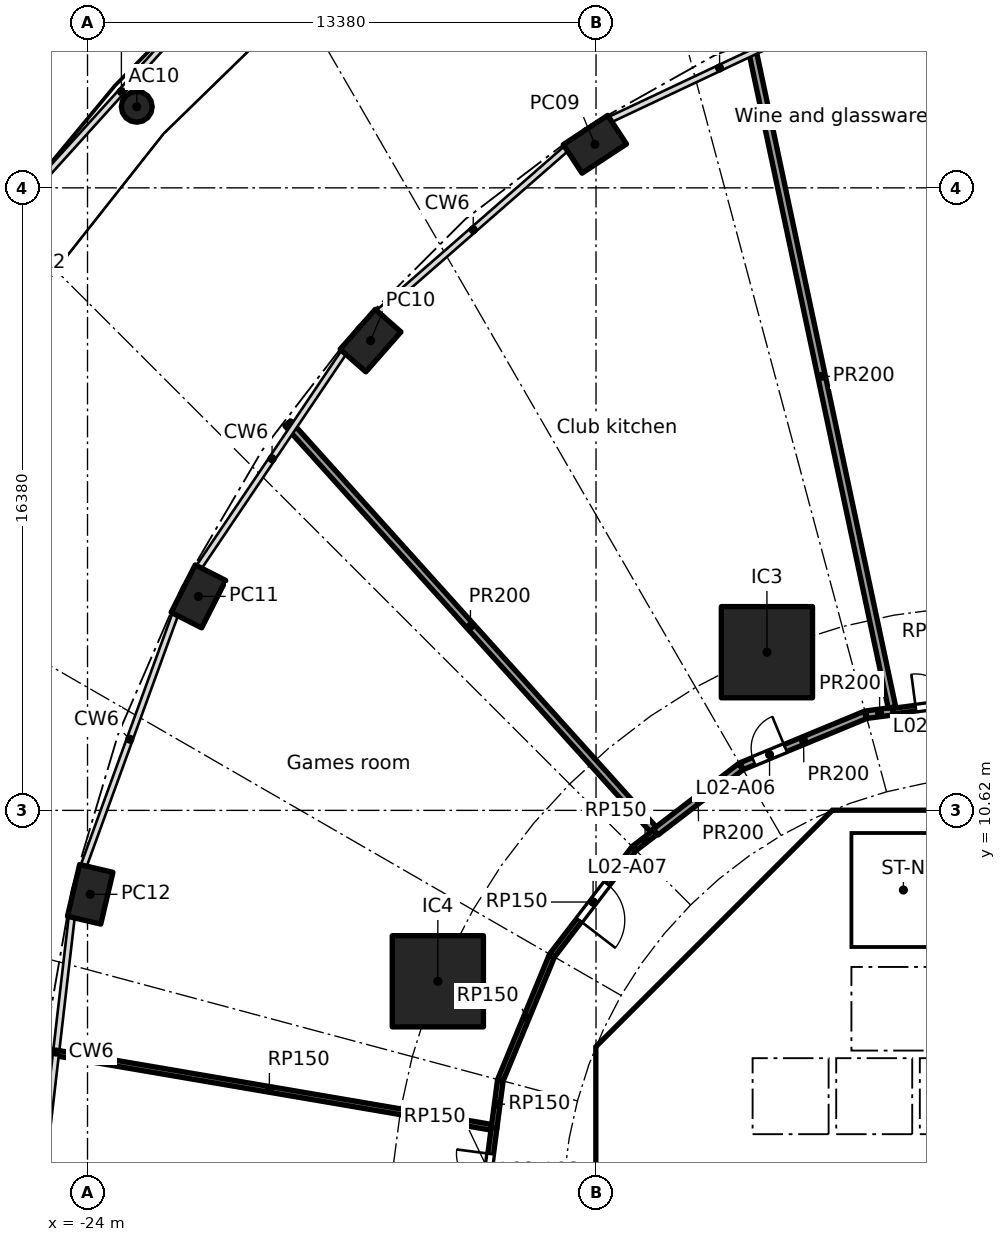
"""IFC4 building model, lengths in metres.
Left out: names, types, materials, properties, quantities, classifications, styles, units other than length and angle.
Written with IfcOpenShell. Run it as: python <this file> out.ifc"""

import sys

from ifc_helpers import new_model, si_unit, direction, frame, frame_2d, origin, origin_2d, place, context, subcontext, project, spatial, polyline, rectangle, hollow_rectangle, hollow_circle, outline, extrude, element, fill, save


model = new_model("IFC4")
c1 = context("Model", 3, precision=1e-05, world=origin(), true_north=direction((0.0, 1.0)))
c2 = subcontext(c1, "Body", "Model", "MODEL_VIEW")
j1 = project(units=[si_unit("LENGTHUNIT", "METRE"), si_unit("PLANEANGLEUNIT", "RADIAN")], contexts=[c1])
p1 = place(None, origin())
s1 = spatial("IfcSite", under=j1, at=p1, CompositionType="ELEMENT")
p2 = place(p1, origin())
s2 = spatial("IfcBuilding", under=s1, at=p2, CompositionType="ELEMENT")
p3 = place(p2, frame((0.0, 0.0, 12.0)))
s3 = spatial("IfcBuildingStorey", under=s2, at=p3, CompositionType="ELEMENT", Elevation=12.0)
for number, where, z_axis, x_axis in (
    (1, (-10.65, 28.146, 0.0), (0.0, 0.0, 1.0), (-0.836, -0.549, 0.0)),
    (2, (-16.552, 22.981, 0.0), (0.0, 0.0, 1.0), (-0.66, -0.751, 0.0)),
    (3, (-21.082, 16.25, 0.0), (0.0, 0.0, 1.0), (-0.452, -0.892, 0.0)),
    (4, (-23.929, 8.412, 0.0), (0.0, 0.0, 1.0), (-0.229, -0.973, 0.0)),
):
    element("IfcColumn", number, at=place(p3, frame(where, z_axis=z_axis, x_axis=x_axis)), inside=s3, PredefinedType="COLUMN", context=c2, shape_type="SweptSolid", body=[
        extrude(hollow_rectangle(XDim=1.4, YDim=0.9, WallThickness=0.05, at=origin_2d()), origin(), (0.0, 0.0, 1.0), 5.0),
    ])
for number, where, z_axis, x_axis in (
    (5, (-6.123, 14.782, 0.0), (0.0, 0.0, 1.0), (1.0, 0.0, 0.0)),
    (6, (-14.782, 6.123, 0.0), (0.0, 0.0, 1.0), (1.0, 0.0, 0.0)),
):
    element("IfcColumn", number, at=place(p3, frame(where, z_axis=z_axis, x_axis=x_axis)), inside=s3, PredefinedType="COLUMN", context=c2, shape_type="SweptSolid", body=[
        extrude(rectangle(XDim=2.4, YDim=2.4, at=origin_2d()), origin(), (0.0, 0.0, 1.0), 5.0),
    ])
p4 = place(p3, frame((-22.704, 29.133, 0.0), z_axis=(0.0, 0.0, 1.0), x_axis=(1.0, 0.0, 0.0)))
e7 = element("IfcColumn", 7, at=p4, inside=s3, PredefinedType="COLUMN", context=c2, shape_type="SweptSolid", body=[
    extrude(hollow_circle(Radius=0.406, WallThickness=0.025, at=origin_2d()), origin(), (0.0, 0.0, 1.0), 5.0),
])
p5 = place(p3, frame((-4.613, 9.988, 0.0), z_axis=(0.0, 0.0, 1.0), x_axis=(-0.707106781187, -0.707106781187, 0.0)))
e8 = element("IfcWall", 8, at=p5, inside=s3, PredefinedType="SHEAR", context=c2, shape_type="SweptSolid", body=[
    extrude(rectangle(XDim=7.602, YDim=0.6, at=frame_2d((3.801, 0.0))), origin(), (0.0, 0.0, 1.0), 4.7),
])
p6 = place(p5, frame((0.351, 0.0, 0.0)))
e9 = element("IfcOpeningElement", 9, at=p6, cuts=e8, PredefinedType="OPENING", context=c2, shape_type="SweptSolid", body=[
    extrude(rectangle(XDim=1.1, YDim=2.1, at=frame_2d((0.55, 1.05))), frame((0.0, 0.31, 0.0), z_axis=(0.0, -1.0, 0.0), x_axis=(1.0, 0.0, 0.0)), (0.0, 0.0, 1.0), 0.62),
])
p7 = place(p3, frame((-10.325, 3.801, 0.0), z_axis=(0.0, 0.0, 1.0), x_axis=(0.0, -1.0, 0.0)))
e10 = element("IfcWall", 10, at=p7, inside=s3, PredefinedType="SHEAR", context=c2, shape_type="SweptSolid", body=[
    extrude(rectangle(XDim=7.602, YDim=0.6, at=frame_2d((3.801, 0.0))), origin(), (0.0, 0.0, 1.0), 4.7),
])
p8 = place(p7, frame((0.651, 0.0, 0.0)))
e11 = element("IfcOpeningElement", 11, at=p8, cuts=e10, PredefinedType="OPENING", context=c2, shape_type="SweptSolid", body=[
    extrude(rectangle(XDim=1.5, YDim=2.1, at=frame_2d((0.75, 1.05))), frame((0.0, 0.31, 0.0), z_axis=(0.0, -1.0, 0.0), x_axis=(1.0, 0.0, 0.0)), (0.0, 0.0, 1.0), 0.62),
])
p9 = place(p7, frame((5.451, 0.0, 0.0)))
e12 = element("IfcOpeningElement", 12, at=p9, cuts=e10, PredefinedType="OPENING", context=c2, shape_type="SweptSolid", body=[
    extrude(rectangle(XDim=1.5, YDim=2.1, at=frame_2d((0.75, 1.05))), frame((0.0, 0.31, 0.0), z_axis=(0.0, -1.0, 0.0), x_axis=(1.0, 0.0, 0.0)), (0.0, 0.0, 1.0), 0.62),
])
p10 = place(p3, frame((-5.8, 4.3, 0.0), z_axis=(0.0, 0.0, 1.0), x_axis=(0.0, 1.0, 0.0)))
e13 = element("IfcWall", 13, at=p10, inside=s3, PredefinedType="PARTITIONING", context=c2, shape_type="SweptSolid", body=[
    extrude(rectangle(XDim=3.927, YDim=0.15, at=frame_2d((1.963, 0.0))), origin(), (0.0, 0.0, 1.0), 4.7),
])
p11 = place(p10, frame((1.551, 0.0, 0.0)))
e14 = element("IfcOpeningElement", 14, at=p11, cuts=e13, PredefinedType="OPENING", context=c2, shape_type="SweptSolid", body=[
    extrude(rectangle(XDim=0.9, YDim=2.1, at=frame_2d((0.45, 1.05))), frame((0.0, 0.085, 0.0), z_axis=(0.0, -1.0, 0.0), x_axis=(1.0, 0.0, 0.0)), (0.0, 0.0, 1.0), 0.17),
])
p12 = place(p3, frame((-4.0, 4.3, 0.0), z_axis=(0.0, 0.0, 1.0), x_axis=(0.0, 1.0, 0.0)))
e15 = element("IfcWall", 15, at=p12, inside=s3, PredefinedType="SOLIDWALL", context=c2, shape_type="SweptSolid", body=[
    extrude(rectangle(XDim=2.2, YDim=0.2, at=frame_2d((1.1, 0.0))), origin(), (0.0, 0.0, 1.0), 4.7),
])
p13 = place(p12, frame((0.55, 0.0, 0.0)))
e16 = element("IfcOpeningElement", 16, at=p13, cuts=e15, PredefinedType="OPENING", context=c2, shape_type="SweptSolid", body=[
    extrude(rectangle(XDim=1.1, YDim=2.1, at=frame_2d((0.55, 1.05))), frame((0.0, 0.11, 0.0), z_axis=(0.0, -1.0, 0.0), x_axis=(1.0, 0.0, 0.0)), (0.0, 0.0, 1.0), 0.22),
])
p14 = place(p3, frame((-6.7, 2.0, 0.0), z_axis=(0.0, 0.0, 1.0), x_axis=(1.0, 0.0, 0.0)))
e17 = element("IfcWall", 17, at=p14, inside=s3, PredefinedType="SOLIDWALL", context=c2, shape_type="SweptSolid", body=[
    extrude(rectangle(XDim=13.4, YDim=0.2, at=frame_2d((6.7, 0.0))), origin(), (0.0, 0.0, 1.0), 4.7),
])
p15 = place(p14, frame((0.65, 0.0, 0.0)))
e18 = element("IfcOpeningElement", 18, at=p15, cuts=e17, PredefinedType="OPENING", context=c2, shape_type="SweptSolid", body=[
    extrude(rectangle(XDim=1.1, YDim=2.1, at=frame_2d((0.55, 1.05))), frame((0.0, 0.11, 0.0), z_axis=(0.0, -1.0, 0.0), x_axis=(1.0, 0.0, 0.0)), (0.0, 0.0, 1.0), 0.22),
])
p16 = place(p14, frame((2.85, 0.0, 0.0)))
e19 = element("IfcOpeningElement", 19, at=p16, cuts=e17, PredefinedType="OPENING", context=c2, shape_type="SweptSolid", body=[
    extrude(rectangle(XDim=1.1, YDim=2.1, at=frame_2d((0.55, 1.05))), frame((0.0, 0.11, 0.0), z_axis=(0.0, -1.0, 0.0), x_axis=(1.0, 0.0, 0.0)), (0.0, 0.0, 1.0), 0.22),
])
p17 = place(p14, frame((5.05, 0.0, 0.0)))
e20 = element("IfcOpeningElement", 20, at=p17, cuts=e17, PredefinedType="OPENING", context=c2, shape_type="SweptSolid", body=[
    extrude(rectangle(XDim=1.1, YDim=2.1, at=frame_2d((0.55, 1.05))), frame((0.0, 0.11, 0.0), z_axis=(0.0, -1.0, 0.0), x_axis=(1.0, 0.0, 0.0)), (0.0, 0.0, 1.0), 0.22),
])
p18 = place(p3, origin())
e21 = element("IfcWall", 21, at=p18, inside=s3, PredefinedType="SHEAR", context=c2, shape_type="SweptSolid", body=[
    extrude(outline(polyline([(-10.2, 4.825), (-9.776, 4.401), (-10.025, 4.152), (-10.025, 3.801), (-10.625, 3.801), (-10.625, 4.401), (-10.2, 4.825)])), origin(), (0.0, 0.0, 1.0), 4.7),
])
p19 = place(p3, origin())
e22 = element("IfcWall", 22, at=p19, inside=s3, PredefinedType="SHEAR", context=c2, shape_type="SweptSolid", body=[
    extrude(outline(polyline([(-4.152, 10.025), (-4.401, 9.776), (-4.825, 10.2), (-4.401, 10.625), (4.401, 10.625), (4.825, 10.2), (4.401, 9.776), (4.152, 10.025), (-4.152, 10.025)])), origin(), (0.0, 0.0, 1.0), 4.7),
])
p20 = place(p3, origin())
e23 = element("IfcWall", 23, at=p20, inside=s3, PredefinedType="SOLIDWALL", context=c2, shape_type="SweptSolid", body=[
    extrude(outline(polyline([(-6.5, 2.1), (-6.7, 2.1), (-6.7, 4.3), (6.7, 4.3), (6.7, 2.1), (6.5, 2.1), (6.5, 4.1), (4.5, 4.1), (4.5, 2.1), (4.3, 2.1), (4.3, 4.1), (2.3, 4.1), (2.3, 2.1), (2.1, 2.1), (2.1, 4.1), (0.1, 4.1), (0.1, 2.1), (-0.1, 2.1), (-0.1, 4.1), (-2.1, 4.1), (-2.1, 2.1), (-2.3, 2.1), (-2.3, 4.1), (-4.3, 4.1), (-4.3, 2.1), (-4.5, 2.1), (-4.5, 4.1), (-6.5, 4.1), (-6.5, 2.1)])), origin(), (0.0, 0.0, 1.0), 4.7),
])
p21 = place(p3, frame((-10.025, 4.0, 0.0), z_axis=(0.0, 0.0, 1.0), x_axis=(1.0, 0.0, 0.0)))
e24 = element("IfcWall", 24, at=p21, inside=s3, PredefinedType="PARTITIONING", context=c2, shape_type="SweptSolid", body=[
    extrude(rectangle(XDim=3.325, YDim=0.2, at=frame_2d((1.662, 0.0))), origin(), (0.0, 0.0, 1.0), 4.7),
])
p22 = place(p3, origin())
e25 = element("IfcWall", 25, at=p22, inside=s3, PredefinedType="SOLIDWALL", context=c2, shape_type="SweptSolid", body=[
    extrude(outline(polyline([(-3.9, 7.025), (-4.1, 7.025), (-4.1, 10.025), (-3.9, 10.025), (-3.9, 7.025)])), origin(), (0.0, 0.0, 1.0), 4.7),
])
p23 = place(p3, origin())
e26 = element("IfcWall", 26, at=p23, inside=s3, PredefinedType="SOLIDWALL", context=c2, shape_type="SweptSolid", body=[
    extrude(outline(polyline([(4.1, 6.5), (-4.1, 6.5), (-4.1, 7.025), (4.1, 7.025), (4.1, 6.5)])), origin(), (0.0, 0.0, 1.0), 4.7),
])
p24 = place(p3, frame((-13.598, 0.012, 0.0), z_axis=(0.0, 0.0, 1.0), x_axis=(0.130457285505, 0.991453930679, 0.0)))
e27 = element("IfcWall", 27, at=p24, inside=s3, PredefinedType="PARTITIONING", context=c2, shape_type="SweptSolid", body=[
    extrude(rectangle(XDim=2.278, YDim=0.15, at=frame_2d((1.139, 0.0))), origin(), (0.0, 0.0, 1.0), 4.7),
])
p25 = place(p24, frame((0.683, 0.0, 0.0)))
e28 = element("IfcOpeningElement", 28, at=p25, cuts=e27, PredefinedType="OPENING", context=c2, shape_type="SweptSolid", body=[
    extrude(rectangle(XDim=0.9, YDim=2.1, at=frame_2d((0.45, 1.05))), frame((0.0, 0.085, 0.0), z_axis=(0.0, -1.0, 0.0), x_axis=(1.0, 0.0, 0.0)), (0.0, 0.0, 1.0), 0.17),
])
p26 = place(p3, frame((-13.375, 2.282, 0.0), z_axis=(0.0, 0.0, 1.0), x_axis=(-0.985753347153, 0.168197320361, 0.0)))
e29 = element("IfcWall", 29, at=p26, inside=s3, PredefinedType="PARTITIONING", context=c2, shape_type="SweptSolid", body=[
    extrude(rectangle(XDim=11.847, YDim=0.15, at=frame_2d((5.924, 0.0))), origin(), (0.0, 0.0, 1.0), 4.7),
])
p27 = place(p3, frame((-13.301, 2.27, 0.0), z_axis=(0.0, 0.0, 1.0), x_axis=(0.130575867104, 0.991438320285, 0.0)))
e30 = element("IfcWall", 30, at=p27, inside=s3, PredefinedType="PARTITIONING", context=c2, shape_type="SweptSolid", body=[
    extrude(rectangle(XDim=1.249, YDim=0.15, at=frame_2d((0.625, 0.0))), origin(), (0.0, 0.0, 1.0), 4.7),
])
p28 = place(p3, frame((-13.132, 3.531, 0.0), z_axis=(0.0, 0.0, 1.0), x_axis=(0.382677866108, 0.923881838111, 0.0)))
e31 = element("IfcWall", 31, at=p28, inside=s3, PredefinedType="PARTITIONING", context=c2, shape_type="SweptSolid", body=[
    extrude(rectangle(XDim=3.527, YDim=0.15, at=frame_2d((1.763, 0.0))), origin(), (0.0, 0.0, 1.0), 4.7),
])
p29 = place(p3, frame((-11.771, 6.809, 0.0), z_axis=(0.0, 0.0, 1.0), x_axis=(0.608736710054, 0.793372307201, 0.0)))
e32 = element("IfcWall", 32, at=p29, inside=s3, PredefinedType="PARTITIONING", context=c2, shape_type="SweptSolid", body=[
    extrude(rectangle(XDim=3.527, YDim=0.15, at=frame_2d((1.763, 0.0))), origin(), (0.0, 0.0, 1.0), 4.7),
])
p30 = place(p29, frame((1.163, 0.0, 0.0)))
e33 = element("IfcOpeningElement", 33, at=p30, cuts=e32, PredefinedType="OPENING", context=c2, shape_type="SweptSolid", body=[
    extrude(rectangle(XDim=1.2, YDim=2.1, at=frame_2d((0.6, 1.05))), frame((0.0, 0.085, 0.0), z_axis=(0.0, -1.0, 0.0), x_axis=(1.0, 0.0, 0.0)), (0.0, 0.0, 1.0), 0.17),
])
p31 = place(p3, frame((-9.607, 9.624, 0.0), z_axis=(0.0, 0.0, 1.0), x_axis=(0.793399175387, 0.608701690893, 0.0)))
e34 = element("IfcWall", 34, at=p31, inside=s3, PredefinedType="PARTITIONING", context=c2, shape_type="SweptSolid", body=[
    extrude(rectangle(XDim=0.702, YDim=0.15, at=frame_2d((0.351, 0.0))), origin(), (0.0, 0.0, 1.0), 4.7),
])
p32 = place(p3, frame((-2.812, 13.23, 0.0), z_axis=(0.0, 0.0, 1.0), x_axis=(0.991438625664, 0.130573548402, 0.0)))
e35 = element("IfcWall", 35, at=p32, inside=s3, PredefinedType="PARTITIONING", context=c2, shape_type="SweptSolid", body=[
    extrude(rectangle(XDim=2.122, YDim=0.15, at=frame_2d((1.061, 0.0))), origin(), (0.0, 0.0, 1.0), 4.7),
])
p33 = place(p32, frame((0.611, 0.0, 0.0)))
e36 = element("IfcOpeningElement", 36, at=p33, cuts=e35, PredefinedType="OPENING", context=c2, shape_type="SweptSolid", body=[
    extrude(rectangle(XDim=0.9, YDim=2.1, at=frame_2d((0.45, 1.05))), frame((0.0, 0.085, 0.0), z_axis=(0.0, -1.0, 0.0), x_axis=(1.0, 0.0, 0.0)), (0.0, 0.0, 1.0), 0.17),
])
p34 = place(p3, frame((-18.731, 20.803, 0.0), z_axis=(0.0, 0.0, 1.0), x_axis=(0.669127133422, -0.743147952509, 0.0)))
e37 = element("IfcWall", 37, at=p34, inside=s3, PredefinedType="PARTITIONING", context=c2, shape_type="SweptSolid", body=[
    extrude(rectangle(XDim=14.367, YDim=0.2, at=frame_2d((7.184, 0.0))), origin(), (0.0, 0.0, 1.0), 4.7),
])
p35 = place(p3, frame((-9.05, 10.051, 0.0), z_axis=(0.0, 0.0, 1.0), x_axis=(0.793389024662, 0.608714921409, 0.0)))
e38 = element("IfcWall", 38, at=p35, inside=s3, PredefinedType="PARTITIONING", context=c2, shape_type="SweptSolid", body=[
    extrude(rectangle(XDim=2.821, YDim=0.2, at=frame_2d((1.411, 0.0))), origin(), (0.0, 0.0, 1.0), 4.7),
])
p36 = place(p3, frame((-6.786, 11.784, 0.0), z_axis=(0.0, 0.0, 1.0), x_axis=(0.92386297064, 0.382723413813, 0.0)))
e39 = element("IfcWall", 39, at=p36, inside=s3, PredefinedType="PARTITIONING", context=c2, shape_type="SweptSolid", body=[
    extrude(rectangle(XDim=3.52, YDim=0.2, at=frame_2d((1.76, 0.0))), origin(), (0.0, 0.0, 1.0), 4.7),
])
p37 = place(p36, frame((0.342, 0.0, 0.0)))
e40 = element("IfcOpeningElement", 40, at=p37, cuts=e39, PredefinedType="OPENING", context=c2, shape_type="SweptSolid", body=[
    extrude(rectangle(XDim=0.9, YDim=2.1, at=frame_2d((0.45, 1.05))), frame((0.0, 0.11, 0.0), z_axis=(0.0, -1.0, 0.0), x_axis=(1.0, 0.0, 0.0)), (0.0, 0.0, 1.0), 0.22),
])
p38 = place(p3, frame((-3.505, 13.139, 0.0), z_axis=(0.0, 0.0, 1.0), x_axis=(0.991473310532, 0.130309917135, 0.0)))
e41 = element("IfcWall", 41, at=p38, inside=s3, PredefinedType="PARTITIONING", context=c2, shape_type="SweptSolid", body=[
    extrude(rectangle(XDim=0.699, YDim=0.2, at=frame_2d((0.349, 0.0))), origin(), (0.0, 0.0, 1.0), 4.7),
])
p39 = place(p3, frame((-2.833, 13.328, 0.0), z_axis=(0.0, 0.0, 1.0), x_axis=(-0.207909569071, 0.978148051722, 0.0)))
e42 = element("IfcWall", 42, at=p39, inside=s3, PredefinedType="PARTITIONING", context=c2, shape_type="SweptSolid", body=[
    extrude(rectangle(XDim=17.813, YDim=0.2, at=frame_2d((8.907, 0.0))), origin(), (0.0, 0.0, 1.0), 4.7),
])
p40 = place(p15, origin())
e43 = element("IfcDoor", 43, at=p40, inside=s3, OperationType="DOUBLE_DOOR_SLIDING", PredefinedType="DOOR", context=c2, shape_type="SweptSolid", body=[
    extrude(rectangle(XDim=1.1, YDim=2.1, at=frame_2d((0.55, 1.05))), frame((0.0, 0.025, 0.0), z_axis=(0.0, -1.0, 0.0), x_axis=(1.0, 0.0, 0.0)), (0.0, 0.0, 1.0), 0.05),
])
fill(e18, e43)
p41 = place(p16, origin())
e44 = element("IfcDoor", 44, at=p41, inside=s3, OperationType="DOUBLE_DOOR_SLIDING", PredefinedType="DOOR", context=c2, shape_type="SweptSolid", body=[
    extrude(rectangle(XDim=1.1, YDim=2.1, at=frame_2d((0.55, 1.05))), frame((0.0, 0.025, 0.0), z_axis=(0.0, -1.0, 0.0), x_axis=(1.0, 0.0, 0.0)), (0.0, 0.0, 1.0), 0.05),
])
fill(e19, e44)
p42 = place(p13, origin())
e45 = element("IfcDoor", 45, at=p42, inside=s3, OperationType="DOUBLE_DOOR_SLIDING", PredefinedType="DOOR", context=c2, shape_type="SweptSolid", body=[
    extrude(rectangle(XDim=1.1, YDim=2.1, at=frame_2d((0.55, 1.05))), frame((0.0, 0.025, 0.0), z_axis=(0.0, -1.0, 0.0), x_axis=(1.0, 0.0, 0.0)), (0.0, 0.0, 1.0), 0.05),
])
fill(e16, e45)
p43 = place(p11, origin())
e46 = element("IfcDoor", 46, at=p43, inside=s3, OperationType="SINGLE_SWING_LEFT", PredefinedType="DOOR", context=c2, shape_type="SweptSolid", body=[
    extrude(rectangle(XDim=0.9, YDim=2.1, at=frame_2d((0.45, 1.05))), frame((0.0, 0.025, 0.0), z_axis=(0.0, -1.0, 0.0), x_axis=(1.0, 0.0, 0.0)), (0.0, 0.0, 1.0), 0.05),
])
fill(e14, e46)
p44 = place(p8, origin())
e47 = element("IfcDoor", 47, at=p44, inside=s3, OperationType="DOUBLE_DOOR_SINGLE_SWING", PredefinedType="DOOR", context=c2, shape_type="SweptSolid", body=[
    extrude(rectangle(XDim=1.5, YDim=2.1, at=frame_2d((0.75, 1.05))), frame((0.0, 0.025, 0.0), z_axis=(0.0, -1.0, 0.0), x_axis=(1.0, 0.0, 0.0)), (0.0, 0.0, 1.0), 0.05),
])
fill(e11, e47)
p45 = place(p6, origin())
e48 = element("IfcDoor", 48, at=p45, inside=s3, OperationType="SINGLE_SWING_RIGHT", PredefinedType="DOOR", context=c2, shape_type="SweptSolid", body=[
    extrude(rectangle(XDim=1.1, YDim=2.1, at=frame_2d((0.55, 1.05))), frame((0.0, 0.025, 0.0), z_axis=(0.0, -1.0, 0.0), x_axis=(1.0, 0.0, 0.0)), (0.0, 0.0, 1.0), 0.05),
])
fill(e9, e48)
p46 = place(p33, origin())
e49 = element("IfcDoor", 49, at=p46, inside=s3, OperationType="SINGLE_SWING_LEFT", PredefinedType="DOOR", context=c2, shape_type="SweptSolid", body=[
    extrude(rectangle(XDim=0.9, YDim=2.1, at=frame_2d((0.45, 1.05))), frame((0.0, 0.025, 0.0), z_axis=(0.0, -1.0, 0.0), x_axis=(1.0, 0.0, 0.0)), (0.0, 0.0, 1.0), 0.05),
])
fill(e36, e49)
p47 = place(p37, origin())
e50 = element("IfcDoor", 50, at=p47, inside=s3, OperationType="SINGLE_SWING_RIGHT", PredefinedType="DOOR", context=c2, shape_type="SweptSolid", body=[
    extrude(rectangle(XDim=0.9, YDim=2.1, at=frame_2d((0.45, 1.05))), frame((0.0, 0.025, 0.0), z_axis=(0.0, -1.0, 0.0), x_axis=(1.0, 0.0, 0.0)), (0.0, 0.0, 1.0), 0.05),
])
fill(e40, e50)
p48 = place(p30, frame((1.2, 0.0, 0.0), x_axis=(-1.0, 0.0, 0.0)))
e51 = element("IfcDoor", 51, at=p48, inside=s3, OperationType="SINGLE_SWING_RIGHT", PredefinedType="DOOR", context=c2, shape_type="SweptSolid", body=[
    extrude(rectangle(XDim=1.2, YDim=2.1, at=frame_2d((0.6, 1.05))), frame((0.0, 0.025, 0.0), z_axis=(0.0, -1.0, 0.0), x_axis=(1.0, 0.0, 0.0)), (0.0, 0.0, 1.0), 0.05),
])
fill(e33, e51)
p49 = place(p25, origin())
e52 = element("IfcDoor", 52, at=p49, inside=s3, OperationType="SINGLE_SWING_RIGHT", PredefinedType="DOOR", context=c2, shape_type="SweptSolid", body=[
    extrude(rectangle(XDim=0.9, YDim=2.1, at=frame_2d((0.45, 1.05))), frame((0.0, 0.025, 0.0), z_axis=(0.0, -1.0, 0.0), x_axis=(1.0, 0.0, 0.0)), (0.0, 0.0, 1.0), 0.05),
])
fill(e28, e52)
save(model, sys.argv[1])
